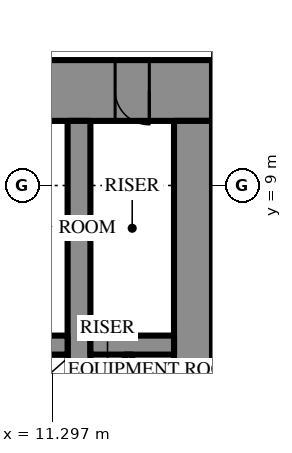
"""IFC4 building model, lengths in metres.
Left out: names, types, materials, properties, quantities, classifications, styles, units other than length and angle.
Written with IfcOpenShell. Run it as: python <this file> out.ifc"""

import sys

from ifc_helpers import new_model, si_unit, direction, frame, frame_2d, origin, place, context, subcontext, project, spatial, rectangle, extrude, element, fill, save


model = new_model("IFC4")
c1 = context("Model", 3, precision=1e-05, world=origin(), true_north=direction((0.0, 1.0)))
c2 = subcontext(c1, "Body", "Model", "MODEL_VIEW")
j1 = project(units=[si_unit("LENGTHUNIT", "METRE"), si_unit("PLANEANGLEUNIT", "RADIAN")], contexts=[c1])
p1 = place(None, origin())
s1 = spatial("IfcSite", under=j1, at=p1, CompositionType="ELEMENT")
p2 = place(p1, origin())
s2 = spatial("IfcBuilding", under=s1, at=p2, CompositionType="ELEMENT")
p3 = place(p2, frame((0.0, 0.0, 261.7)))
s3 = spatial("IfcBuildingStorey", under=s2, at=p3, CompositionType="ELEMENT", Elevation=261.7)
p4 = place(p3, frame((-15.5, 11.5, 0.0), z_axis=(0.0, 0.0, 1.0), x_axis=(1.0, 0.0, 0.0)))
e1 = element("IfcWall", 1, at=p4, inside=s3, PredefinedType="SHEAR", context=c2, shape_type="SweptSolid", body=[
    extrude(rectangle(XDim=31.0, YDim=1.6, at=frame_2d((15.5, 0.0))), origin(), (0.0, 0.0, 1.0), 4.2),
])
p5 = place(p4, frame((16.35, 0.0, 0.0)))
e2 = element("IfcOpeningElement", 2, at=p5, cuts=e1, PredefinedType="OPENING", context=c2, shape_type="SweptSolid", body=[
    extrude(rectangle(XDim=0.9, YDim=2.2, at=frame_2d((0.45, 1.1))), frame((0.0, 0.81, 0.0), z_axis=(0.0, -1.0, 0.0), x_axis=(1.0, 0.0, 0.0)), (0.0, 0.0, 1.0), 1.62),
])
p6 = place(p4, frame((19.35, 0.0, 0.0)))
e3 = element("IfcOpeningElement", 3, at=p6, cuts=e1, PredefinedType="OPENING", context=c2, shape_type="SweptSolid", body=[
    extrude(rectangle(XDim=0.9, YDim=2.2, at=frame_2d((0.45, 1.1))), frame((0.0, 0.81, 0.0), z_axis=(0.0, -1.0, 0.0), x_axis=(1.0, 0.0, 0.0)), (0.0, 0.0, 1.0), 1.62),
])
p7 = place(p4, frame((22.4, 0.0, 0.0)))
e4 = element("IfcOpeningElement", 4, at=p7, cuts=e1, PredefinedType="OPENING", context=c2, shape_type="SweptSolid", body=[
    extrude(rectangle(XDim=1.0, YDim=2.2, at=frame_2d((0.5, 1.1))), frame((0.0, 0.81, 0.0), z_axis=(0.0, -1.0, 0.0), x_axis=(1.0, 0.0, 0.0)), (0.0, 0.0, 1.0), 1.62),
])
p8 = place(p4, frame((1.65, 0.0, 0.0)))
e5 = element("IfcOpeningElement", 5, at=p8, cuts=e1, PredefinedType="OPENING", context=c2, shape_type="SweptSolid", body=[
    extrude(rectangle(XDim=0.9, YDim=2.2, at=frame_2d((0.45, 1.1))), frame((0.0, 0.81, 0.0), z_axis=(0.0, -1.0, 0.0), x_axis=(1.0, 0.0, 0.0)), (0.0, 0.0, 1.0), 1.62),
])
p9 = place(p4, frame((4.65, 0.0, 0.0)))
e6 = element("IfcOpeningElement", 6, at=p9, cuts=e1, PredefinedType="OPENING", context=c2, shape_type="SweptSolid", body=[
    extrude(rectangle(XDim=0.9, YDim=2.2, at=frame_2d((0.45, 1.1))), frame((0.0, 0.81, 0.0), z_axis=(0.0, -1.0, 0.0), x_axis=(1.0, 0.0, 0.0)), (0.0, 0.0, 1.0), 1.62),
])
p10 = place(p4, frame((25.45, 0.0, 0.0)))
e7 = element("IfcOpeningElement", 7, at=p10, cuts=e1, PredefinedType="OPENING", context=c2, shape_type="SweptSolid", body=[
    extrude(rectangle(XDim=0.9, YDim=2.2, at=frame_2d((0.45, 1.1))), frame((0.0, 0.81, 0.0), z_axis=(0.0, -1.0, 0.0), x_axis=(1.0, 0.0, 0.0)), (0.0, 0.0, 1.0), 1.62),
])
p11 = place(p4, frame((28.45, 0.0, 0.0)))
e8 = element("IfcOpeningElement", 8, at=p11, cuts=e1, PredefinedType="OPENING", context=c2, shape_type="SweptSolid", body=[
    extrude(rectangle(XDim=0.9, YDim=2.2, at=frame_2d((0.45, 1.1))), frame((0.0, 0.81, 0.0), z_axis=(0.0, -1.0, 0.0), x_axis=(1.0, 0.0, 0.0)), (0.0, 0.0, 1.0), 1.62),
])
p12 = place(p3, frame((15.0, -10.7, 0.0), z_axis=(0.0, 0.0, 1.0), x_axis=(0.0, 1.0, 0.0)))
e9 = element("IfcWall", 9, at=p12, inside=s3, PredefinedType="SHEAR", context=c2, shape_type="SweptSolid", body=[
    extrude(rectangle(XDim=21.4, YDim=1.0, at=frame_2d((10.7, 0.0))), origin(), (0.0, 0.0, 1.0), 4.2),
])
p13 = place(p12, frame((9.8, 0.0, 0.0)))
e10 = element("IfcOpeningElement", 10, at=p13, cuts=e9, PredefinedType="OPENING", context=c2, shape_type="SweptSolid", body=[
    extrude(rectangle(XDim=1.8, YDim=2.4, at=frame_2d((0.9, 1.2))), frame((0.0, 0.51, 0.0), z_axis=(0.0, -1.0, 0.0), x_axis=(1.0, 0.0, 0.0)), (0.0, 0.0, 1.0), 1.02),
])
p14 = place(p3, frame((12.0, -10.7, 0.0), z_axis=(0.0, 0.0, 1.0), x_axis=(0.0, 1.0, 0.0)))
e11 = element("IfcWall", 11, at=p14, inside=s3, PredefinedType="SHEAR", context=c2, shape_type="SweptSolid", body=[
    extrude(rectangle(XDim=21.4, YDim=0.6, at=frame_2d((10.7, 0.0))), origin(), (0.0, 0.0, 1.0), 4.2),
])
p15 = place(p14, frame((9.8, 0.0, 0.0)))
e12 = element("IfcOpeningElement", 12, at=p15, cuts=e11, PredefinedType="OPENING", context=c2, shape_type="SweptSolid", body=[
    extrude(rectangle(XDim=1.8, YDim=2.4, at=frame_2d((0.9, 1.2))), frame((0.0, 0.31, 0.0), z_axis=(0.0, -1.0, 0.0), x_axis=(1.0, 0.0, 0.0)), (0.0, 0.0, 1.0), 0.62),
])
p16 = place(p3, frame((-11.7, 4.8, 0.0), z_axis=(0.0, 0.0, 1.0), x_axis=(1.0, 0.0, 0.0)))
e13 = element("IfcWall", 13, at=p16, inside=s3, PredefinedType="SHEAR", context=c2, shape_type="SweptSolid", body=[
    extrude(rectangle(XDim=23.4, YDim=0.5, at=frame_2d((11.7, 0.0))), origin(), (0.0, 0.0, 1.0), 4.2),
])
p17 = place(p16, frame((6.6, 0.0, 0.0)))
e14 = element("IfcOpeningElement", 14, at=p17, cuts=e13, PredefinedType="OPENING", context=c2, shape_type="SweptSolid", body=[
    extrude(rectangle(XDim=1.2, YDim=2.2, at=frame_2d((0.6, 1.1))), frame((0.0, 0.26, 0.0), z_axis=(0.0, -1.0, 0.0), x_axis=(1.0, 0.0, 0.0)), (0.0, 0.0, 1.0), 0.52),
])
p18 = place(p16, frame((3.6, 0.0, 0.0)))
e15 = element("IfcOpeningElement", 15, at=p18, cuts=e13, PredefinedType="OPENING", context=c2, shape_type="SweptSolid", body=[
    extrude(rectangle(XDim=1.2, YDim=2.2, at=frame_2d((0.6, 1.1))), frame((0.0, 0.26, 0.0), z_axis=(0.0, -1.0, 0.0), x_axis=(1.0, 0.0, 0.0)), (0.0, 0.0, 1.0), 0.52),
])
p19 = place(p3, frame((12.3, 4.8, 0.0), z_axis=(0.0, 0.0, 1.0), x_axis=(1.0, 0.0, 0.0)))
e16 = element("IfcWall", 16, at=p19, inside=s3, PredefinedType="SHEAR", context=c2, shape_type="SweptSolid", body=[
    extrude(rectangle(XDim=2.2, YDim=0.5, at=frame_2d((1.1, 0.0))), origin(), (0.0, 0.0, 1.0), 4.2),
])
p20 = place(p3, frame((13.3, 3.55, 0.0), z_axis=(0.0, 0.0, 1.0), x_axis=(0.0, 1.0, 0.0)))
e17 = element("IfcWall", 17, at=p20, inside=s3, PredefinedType="PARTITIONING", context=c2, shape_type="SweptSolid", body=[
    extrude(rectangle(XDim=1.0, YDim=0.2, at=frame_2d((0.5, 0.0))), origin(), (0.0, 0.0, 1.0), 4.0),
])
p21 = place(p11, frame((0.9, 0.0, 0.0), z_axis=(0.0, 0.0, 1.0), x_axis=(-1.0, 0.0, 0.0)))
e18 = element("IfcDoor", 18, at=p21, inside=s3, OperationType="SINGLE_SWING_RIGHT", PredefinedType="DOOR", context=c2, shape_type="SweptSolid", body=[
    extrude(rectangle(XDim=0.9, YDim=2.2, at=frame_2d((0.45, 1.1))), frame((0.0, 0.025, 0.0), z_axis=(0.0, -1.0, 0.0), x_axis=(1.0, 0.0, 0.0)), (0.0, 0.0, 1.0), 0.05),
])
fill(e8, e18)
save(model, sys.argv[1])
